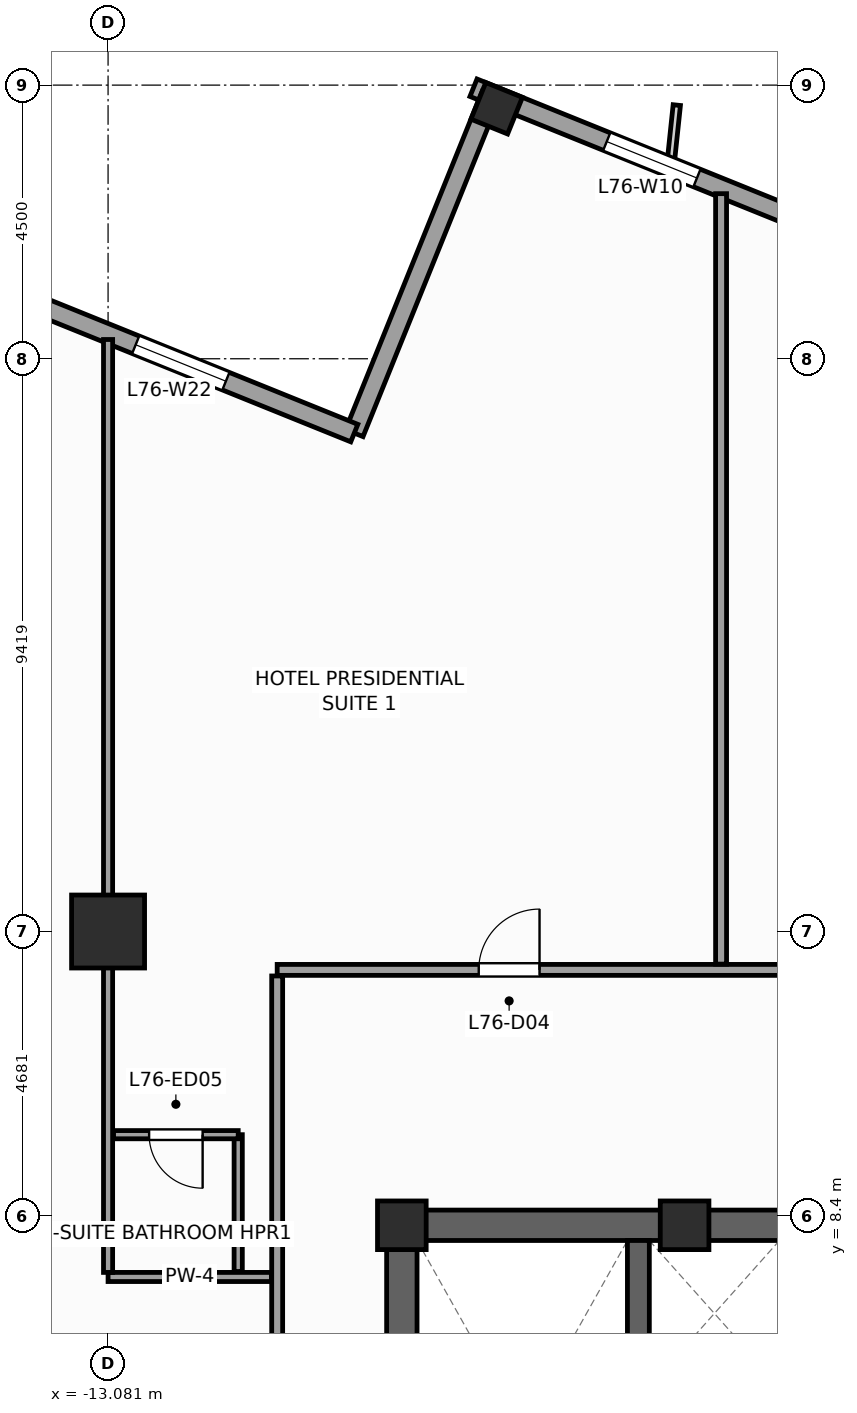
"""IFC4 building model, lengths in metres.
Left out: names, types, materials, properties, quantities, classifications, styles, units other than length and angle.
Written with IfcOpenShell. Run it as: python <this file> out.ifc"""

import sys

from ifc_helpers import new_model, si_unit, direction, frame, frame_2d, origin, origin_2d, place, context, subcontext, project, spatial, rectangle, extrude, source, transform, mapped, element, fill, save


model = new_model("IFC4")
c1 = context("Model", 3, precision=1e-05, world=origin(), true_north=direction((0.0, 1.0)))
c2 = subcontext(c1, "Body", "Model", "MODEL_VIEW")
j1 = project(units=[si_unit("LENGTHUNIT", "METRE"), si_unit("PLANEANGLEUNIT", "RADIAN")], contexts=[c1])
p1 = place(None, origin())
s1 = spatial("IfcSite", under=j1, at=p1, CompositionType="ELEMENT")
p2 = place(p1, origin())
s2 = spatial("IfcBuilding", under=s1, at=p2, CompositionType="ELEMENT")
p3 = place(p2, frame((0.0, 0.0, 308.4)))
s3 = spatial("IfcBuildingStorey", under=s2, at=p3, CompositionType="ELEMENT", Elevation=308.4)
p4 = place(p3, frame((-8.5, 8.25, 0.0), z_axis=(0.0, 0.0, 1.0), x_axis=(1.0, 0.0, 0.0)))
e1 = element("IfcWall", 1, at=p4, inside=s3, PredefinedType="SHEAR", context=c2, shape_type="SweptSolid", body=[
    extrude(rectangle(XDim=17.0, YDim=0.5, at=frame_2d((8.5, 0.0))), origin(), (0.0, 0.0, 1.0), 3.6),
])
p5 = place(p3, frame((-8.25, -8.0, 0.0), z_axis=(0.0, 0.0, 1.0), x_axis=(0.0, 1.0, 0.0)))
e2 = element("IfcWall", 2, at=p5, inside=s3, PredefinedType="SHEAR", context=c2, shape_type="SweptSolid", body=[
    extrude(rectangle(XDim=16.0, YDim=0.5, at=frame_2d((8.0, 0.0))), origin(), (0.0, 0.0, 1.0), 3.6),
])
p6 = place(p5, frame((4.69, 0.0, 0.0)))
e3 = element("IfcOpeningElement", 3, at=p6, cuts=e2, PredefinedType="OPENING", context=c2, shape_type="SweptSolid", body=[
    extrude(rectangle(XDim=1.3, YDim=2.2, at=frame_2d((0.65, 1.1))), frame((0.0, 0.26, 0.0), z_axis=(0.0, -1.0, 0.0), x_axis=(1.0, 0.0, 0.0)), (0.0, 0.0, 1.0), 0.52),
])
p7 = place(p3, frame((-4.36, -8.0, 0.0), z_axis=(0.0, 0.0, 1.0), x_axis=(0.0, 1.0, 0.0)))
e4 = element("IfcWall", 4, at=p7, inside=s3, PredefinedType="SHEAR", context=c2, shape_type="SweptSolid", body=[
    extrude(rectangle(XDim=16.0, YDim=0.36, at=frame_2d((8.0, 0.0))), origin(), (0.0, 0.0, 1.0), 3.6),
])
m1 = source(origin(), c2, "Body", "SweptSolid", [
    extrude(rectangle(XDim=0.8, YDim=0.8, at=origin_2d()), origin(), (0.0, 0.0, 1.0), 3.6),
])
for number, where, z_axis, x_axis in (
    (5, (-8.25, 8.25, 0.0), (0.0, 0.0, 1.0), (1.0, 0.0, 0.0)),
    (6, (-3.6, 8.25, 0.0), (0.0, 0.0, 1.0), (1.0, 0.0, 0.0)),
):
    element("IfcColumn", number, at=place(p3, frame(where, z_axis=z_axis, x_axis=x_axis)), inside=s3, PredefinedType="PILASTER", context=c2, shape_type="MappedRepresentation", body=[
        mapped(m1, transform((0.0, 0.0, 0.0), scale=1.0)),
    ])
m2 = source(origin(), c2, "Body", "SweptSolid", [
    extrude(rectangle(XDim=1.2, YDim=1.2, at=origin_2d()), origin(), (0.0, 0.0, 1.0), 3.6),
])
p8 = place(p3, frame((-13.081, 13.081, 0.0), z_axis=(0.0, 0.0, 1.0), x_axis=(1.0, 0.0, 0.0)))
e7 = element("IfcColumn", 7, at=p8, inside=s3, PredefinedType="COLUMN", context=c2, shape_type="MappedRepresentation", body=[
    mapped(m2, transform((0.0, 0.0, 0.0), scale=1.0)),
])
m3 = source(origin(), c2, "Body", "SweptSolid", [
    extrude(rectangle(XDim=0.65, YDim=0.65, at=origin_2d()), origin(), (0.0, 0.0, 1.0), 3.6),
])
p9 = place(p3, frame((-6.69, 26.62, 0.0), z_axis=(0.0, 0.0, 1.0), x_axis=(0.374606593416, 0.927183854567, 0.0)))
e8 = element("IfcColumn", 8, at=p9, inside=s3, PredefinedType="COLUMN", context=c2, shape_type="MappedRepresentation", body=[
    mapped(m3, transform((0.0, 0.0, 0.0), scale=1.0)),
])
p10 = place(p3, frame((23.813, 14.479, 0.0), z_axis=(0.0, 0.0, 1.0), x_axis=(-0.927182657188, 0.374609557019, 0.0)))
e9 = element("IfcWall", 9, at=p10, inside=s3, PredefinedType="STANDARD", context=c2, shape_type="SweptSolid", body=[
    extrude(rectangle(XDim=33.31, YDim=0.31, at=frame_2d((16.655, 0.0))), origin(), (0.0, 0.0, 1.0), 2.75),
])
p11 = place(p10, frame((22.58, 0.0, 0.0)))
e10 = element("IfcOpeningElement", 10, at=p11, cuts=e9, PredefinedType="OPENING", context=c2, shape_type="SweptSolid", body=[
    extrude(rectangle(XDim=1.05, YDim=2.25, at=frame_2d((0.525, 1.125))), frame((0.0, 0.165, 0.0), z_axis=(0.0, -1.0, 0.0), x_axis=(1.0, 0.0, 0.0)), (0.0, 0.0, 1.0), 0.33),
])
p12 = place(p10, frame((3.197, 0.0, 0.47)))
e11 = element("IfcOpeningElement", 11, at=p12, cuts=e9, PredefinedType="OPENING", context=c2, shape_type="SweptSolid", body=[
    extrude(rectangle(XDim=1.6, YDim=2.1, at=frame_2d((0.8, 1.05))), frame((0.0, 0.165, 0.0), z_axis=(0.0, -1.0, 0.0), x_axis=(1.0, 0.0, 0.0)), (0.0, 0.0, 1.0), 0.33),
])
p13 = place(p10, frame((8.86, 0.0, 0.47)))
e12 = element("IfcOpeningElement", 12, at=p13, cuts=e9, PredefinedType="OPENING", context=c2, shape_type="SweptSolid", body=[
    extrude(rectangle(XDim=1.6, YDim=2.1, at=frame_2d((0.8, 1.05))), frame((0.0, 0.165, 0.0), z_axis=(0.0, -1.0, 0.0), x_axis=(1.0, 0.0, 0.0)), (0.0, 0.0, 1.0), 0.33),
])
p14 = place(p10, frame((14.439, 0.0, 0.47)))
e13 = element("IfcOpeningElement", 13, at=p14, cuts=e9, PredefinedType="OPENING", context=c2, shape_type="SweptSolid", body=[
    extrude(rectangle(XDim=1.6, YDim=2.1, at=frame_2d((0.8, 1.05))), frame((0.0, 0.165, 0.0), z_axis=(0.0, -1.0, 0.0), x_axis=(1.0, 0.0, 0.0)), (0.0, 0.0, 1.0), 0.33),
])
p15 = place(p10, frame((19.601, 0.0, 0.47)))
e14 = element("IfcOpeningElement", 14, at=p15, cuts=e9, PredefinedType="OPENING", context=c2, shape_type="SweptSolid", body=[
    extrude(rectangle(XDim=1.6, YDim=2.1, at=frame_2d((0.8, 1.05))), frame((0.0, 0.165, 0.0), z_axis=(0.0, -1.0, 0.0), x_axis=(1.0, 0.0, 0.0)), (0.0, 0.0, 1.0), 0.33),
])
p16 = place(p10, frame((29.347, 0.0, 0.47)))
e15 = element("IfcOpeningElement", 15, at=p16, cuts=e9, PredefinedType="OPENING", context=c2, shape_type="SweptSolid", body=[
    extrude(rectangle(XDim=1.6, YDim=2.1, at=frame_2d((0.8, 1.05))), frame((0.0, 0.165, 0.0), z_axis=(0.0, -1.0, 0.0), x_axis=(1.0, 0.0, 0.0)), (0.0, 0.0, 1.0), 0.33),
])
p17 = place(p3, frame((-6.784, 26.841, 0.0), z_axis=(0.0, 0.0, 1.0), x_axis=(-0.374636620962, -0.927171722085, 0.0)))
e16 = element("IfcWall", 16, at=p17, inside=s3, PredefinedType="STANDARD", context=c2, shape_type="SweptSolid", body=[
    extrude(rectangle(XDim=6.0, YDim=0.31, at=frame_2d((3.0, 0.0))), origin(), (0.0, 0.0, 1.0), 2.65),
])
p18 = place(p3, frame((-9.032, 21.278, 0.0), z_axis=(0.0, 0.0, 1.0), x_axis=(-0.927185411764, 0.374602739196, 0.0)))
e17 = element("IfcWall", 17, at=p18, inside=s3, PredefinedType="STANDARD", context=c2, shape_type="SweptSolid", body=[
    extrude(rectangle(XDim=6.155, YDim=0.31, at=frame_2d((3.078, 0.0))), origin(), (0.0, 0.0, 1.0), 3.35),
])
p19 = place(p18, frame((2.278, 0.0, 0.47)))
e18 = element("IfcOpeningElement", 18, at=p19, cuts=e17, PredefinedType="OPENING", context=c2, shape_type="SweptSolid", body=[
    extrude(rectangle(XDim=1.6, YDim=2.1, at=frame_2d((0.8, 1.05))), frame((0.0, 0.165, 0.0), z_axis=(0.0, -1.0, 0.0), x_axis=(1.0, 0.0, 0.0)), (0.0, 0.0, 1.0), 0.33),
])
p20 = place(p3, frame((-10.3, 12.45, 0.0), z_axis=(0.0, 0.0, 1.0), x_axis=(1.0, 0.0, 0.0)))
e19 = element("IfcWall", 19, at=p20, inside=s3, PredefinedType="PARTITIONING", context=c2, shape_type="SweptSolid", body=[
    extrude(rectangle(XDim=20.6, YDim=0.18, at=frame_2d((10.3, 0.0))), origin(), (0.0, 0.0, 1.0), 3.35),
])
p21 = place(p20, frame((15.036, 0.0, 0.0)))
e20 = element("IfcOpeningElement", 20, at=p21, cuts=e19, PredefinedType="OPENING", context=c2, shape_type="SweptSolid", body=[
    extrude(rectangle(XDim=0.95, YDim=2.1, at=frame_2d((0.475, 1.05))), frame((0.0, 0.1, 0.0), z_axis=(0.0, -1.0, 0.0), x_axis=(1.0, 0.0, 0.0)), (0.0, 0.0, 1.0), 0.2),
])
p22 = place(p20, frame((3.314, 0.0, 0.0)))
e21 = element("IfcOpeningElement", 21, at=p22, cuts=e19, PredefinedType="OPENING", context=c2, shape_type="SweptSolid", body=[
    extrude(rectangle(XDim=1.0, YDim=2.15, at=frame_2d((0.5, 1.075))), frame((0.0, 0.1, 0.0), z_axis=(0.0, -1.0, 0.0), x_axis=(1.0, 0.0, 0.0)), (0.0, 0.0, 1.0), 0.2),
])
p23 = place(p20, frame((10.05, 0.0, 0.0)))
e22 = element("IfcOpeningElement", 22, at=p23, cuts=e19, PredefinedType="OPENING", context=c2, shape_type="SweptSolid", body=[
    extrude(rectangle(XDim=1.0, YDim=2.15, at=frame_2d((0.5, 1.075))), frame((0.0, 0.1, 0.0), z_axis=(0.0, -1.0, 0.0), x_axis=(1.0, 0.0, 0.0)), (0.0, 0.0, 1.0), 0.2),
])
p24 = place(p3, frame((-10.3, -12.35, 0.0), z_axis=(0.0, 0.0, 1.0), x_axis=(0.0, 1.0, 0.0)))
e23 = element("IfcWall", 23, at=p24, inside=s3, PredefinedType="PARTITIONING", context=c2, shape_type="SweptSolid", body=[
    extrude(rectangle(XDim=24.7, YDim=0.18, at=frame_2d((12.35, 0.0))), origin(), (0.0, 0.0, 1.0), 3.35),
])
p25 = place(p24, frame((16.15, 0.0, 0.0)))
e24 = element("IfcOpeningElement", 24, at=p25, cuts=e23, PredefinedType="OPENING", context=c2, shape_type="SweptSolid", body=[
    extrude(rectangle(XDim=1.0, YDim=2.15, at=frame_2d((0.5, 1.075))), frame((0.0, 0.1, 0.0), z_axis=(0.0, -1.0, 0.0), x_axis=(1.0, 0.0, 0.0)), (0.0, 0.0, 1.0), 0.2),
])
p26 = place(p24, frame((2.139, 0.0, 0.0)))
e25 = element("IfcOpeningElement", 25, at=p26, cuts=e23, PredefinedType="OPENING", context=c2, shape_type="SweptSolid", body=[
    extrude(rectangle(XDim=1.0, YDim=2.15, at=frame_2d((0.5, 1.075))), frame((0.0, 0.1, 0.0), z_axis=(0.0, -1.0, 0.0), x_axis=(1.0, 0.0, 0.0)), (0.0, 0.0, 1.0), 0.2),
])
p27 = place(p24, frame((6.35, 0.0, 0.0)))
e26 = element("IfcOpeningElement", 26, at=p27, cuts=e23, PredefinedType="OPENING", context=c2, shape_type="SweptSolid", body=[
    extrude(rectangle(XDim=1.0, YDim=2.15, at=frame_2d((0.5, 1.075))), frame((0.0, 0.1, 0.0), z_axis=(0.0, -1.0, 0.0), x_axis=(1.0, 0.0, 0.0)), (0.0, 0.0, 1.0), 0.2),
])
p28 = place(p24, frame((10.65, 0.0, 0.0)))
e27 = element("IfcOpeningElement", 27, at=p28, cuts=e23, PredefinedType="OPENING", context=c2, shape_type="SweptSolid", body=[
    extrude(rectangle(XDim=1.0, YDim=2.15, at=frame_2d((0.5, 1.075))), frame((0.0, 0.1, 0.0), z_axis=(0.0, -1.0, 0.0), x_axis=(1.0, 0.0, 0.0)), (0.0, 0.0, 1.0), 0.2),
])
p29 = place(p3, frame((-3.0, 12.545, 0.0), z_axis=(0.0, 0.0, 1.0), x_axis=(0.0, 1.0, 0.0)))
e28 = element("IfcWall", 28, at=p29, inside=s3, PredefinedType="PARTITIONING", context=c2, shape_type="SweptSolid", body=[
    extrude(rectangle(XDim=12.67, YDim=0.18, at=frame_2d((6.335, 0.0))), origin(), (0.0, 0.0, 1.0), 3.35),
])
p30 = place(p3, frame((-10.395, 7.4, 0.0), z_axis=(0.0, 0.0, 1.0), x_axis=(-1.0, 0.0, 0.0)))
e29 = element("IfcWall", 29, at=p30, inside=s3, PredefinedType="PARTITIONING", context=c2, shape_type="SweptSolid", body=[
    extrude(rectangle(XDim=2.686, YDim=0.15, at=frame_2d((1.343, 0.0))), origin(), (0.0, 0.0, 1.0), 3.35),
])
p31 = place(p3, frame((-13.081, 7.475, 0.0), z_axis=(0.0, 0.0, 1.0), x_axis=(0.0, 1.0, 0.0)))
e30 = element("IfcWall", 30, at=p31, inside=s3, PredefinedType="PARTITIONING", context=c2, shape_type="SweptSolid", body=[
    extrude(rectangle(XDim=15.342, YDim=0.15, at=frame_2d((7.671, 0.0))), origin(), (0.0, 0.0, 1.0), 2.45),
])
p32 = place(p3, frame((-10.941, 7.49, 0.0), z_axis=(0.0, 0.0, 1.0), x_axis=(0.0, 1.0, 0.0)))
e31 = element("IfcWall", 31, at=p32, inside=s3, PredefinedType="PARTITIONING", context=c2, shape_type="SweptSolid", body=[
    extrude(rectangle(XDim=2.25, YDim=0.135, at=frame_2d((1.125, 0.0))), origin(), (0.0, 0.0, 1.0), 3.35),
])
p33 = place(p3, frame((-12.991, 9.74, 0.0), z_axis=(0.0, 0.0, 1.0), x_axis=(1.0, 0.0, 0.0)))
e32 = element("IfcWall", 32, at=p33, inside=s3, PredefinedType="PARTITIONING", context=c2, shape_type="SweptSolid", body=[
    extrude(rectangle(XDim=2.05, YDim=0.135, at=frame_2d((1.025, 0.0))), origin(), (0.0, 0.0, 1.0), 3.35),
])
p34 = place(p33, frame((0.585, 0.0, 0.0)))
e33 = element("IfcOpeningElement", 33, at=p34, cuts=e32, PredefinedType="OPENING", context=c2, shape_type="SweptSolid", body=[
    extrude(rectangle(XDim=0.88, YDim=2.1, at=frame_2d((0.44, 1.05))), frame((0.0, 0.078, 0.0), z_axis=(0.0, -1.0, 0.0), x_axis=(1.0, 0.0, 0.0)), (0.0, 0.0, 1.0), 0.155),
])
m4 = source(origin(), c2, "Body", "SweptSolid", [
    extrude(rectangle(XDim=1.6, YDim=2.1, at=frame_2d((0.8, 1.05))), frame((0.0, 0.03, 0.0), z_axis=(0.0, -1.0, 0.0), x_axis=(1.0, 0.0, 0.0)), (0.0, 0.0, 1.0), 0.06),
])
p35 = place(p16, origin())
e34 = element("IfcWindow", 34, at=p35, inside=s3, PartitioningType="SINGLE_PANEL", PredefinedType="WINDOW", context=c2, shape_type="MappedRepresentation", body=[
    mapped(m4, transform((0.0, 0.0, 0.0), scale=1.0)),
])
fill(e15, e34)
p36 = place(p19, origin())
e35 = element("IfcWindow", 35, at=p36, inside=s3, PartitioningType="SINGLE_PANEL", PredefinedType="WINDOW", context=c2, shape_type="MappedRepresentation", body=[
    mapped(m4, transform((0.0, 0.0, 0.0), scale=1.0)),
])
fill(e18, e35)
m5 = source(origin(), c2, "Body", "SweptSolid", [
    extrude(rectangle(XDim=1.0, YDim=2.15, at=frame_2d((0.5, 1.075))), frame((0.0, 0.025, 0.0), z_axis=(0.0, -1.0, 0.0), x_axis=(1.0, 0.0, 0.0)), (0.0, 0.0, 1.0), 0.05),
])
p37 = place(p22, origin())
e36 = element("IfcDoor", 36, at=p37, inside=s3, OperationType="SINGLE_SWING_RIGHT", PredefinedType="DOOR", context=c2, shape_type="MappedRepresentation", body=[
    mapped(m5, transform((0.0, 0.0, 0.0), scale=1.0)),
])
fill(e21, e36)
m6 = source(origin(), c2, "Body", "SweptSolid", [
    extrude(rectangle(XDim=0.88, YDim=2.1, at=frame_2d((0.44, 1.05))), frame((0.0, 0.025, 0.0), z_axis=(0.0, -1.0, 0.0), x_axis=(1.0, 0.0, 0.0)), (0.0, 0.0, 1.0), 0.05),
])
p38 = place(p34, frame((0.88, 0.0, 0.0), z_axis=(0.0, 0.0, 1.0), x_axis=(-1.0, 0.0, 0.0)))
e37 = element("IfcDoor", 37, at=p38, inside=s3, OperationType="SINGLE_SWING_RIGHT", PredefinedType="DOOR", context=c2, shape_type="MappedRepresentation", body=[
    mapped(m6, transform((0.0, 0.0, 0.0), scale=1.0)),
])
fill(e33, e37)
save(model, sys.argv[1])
